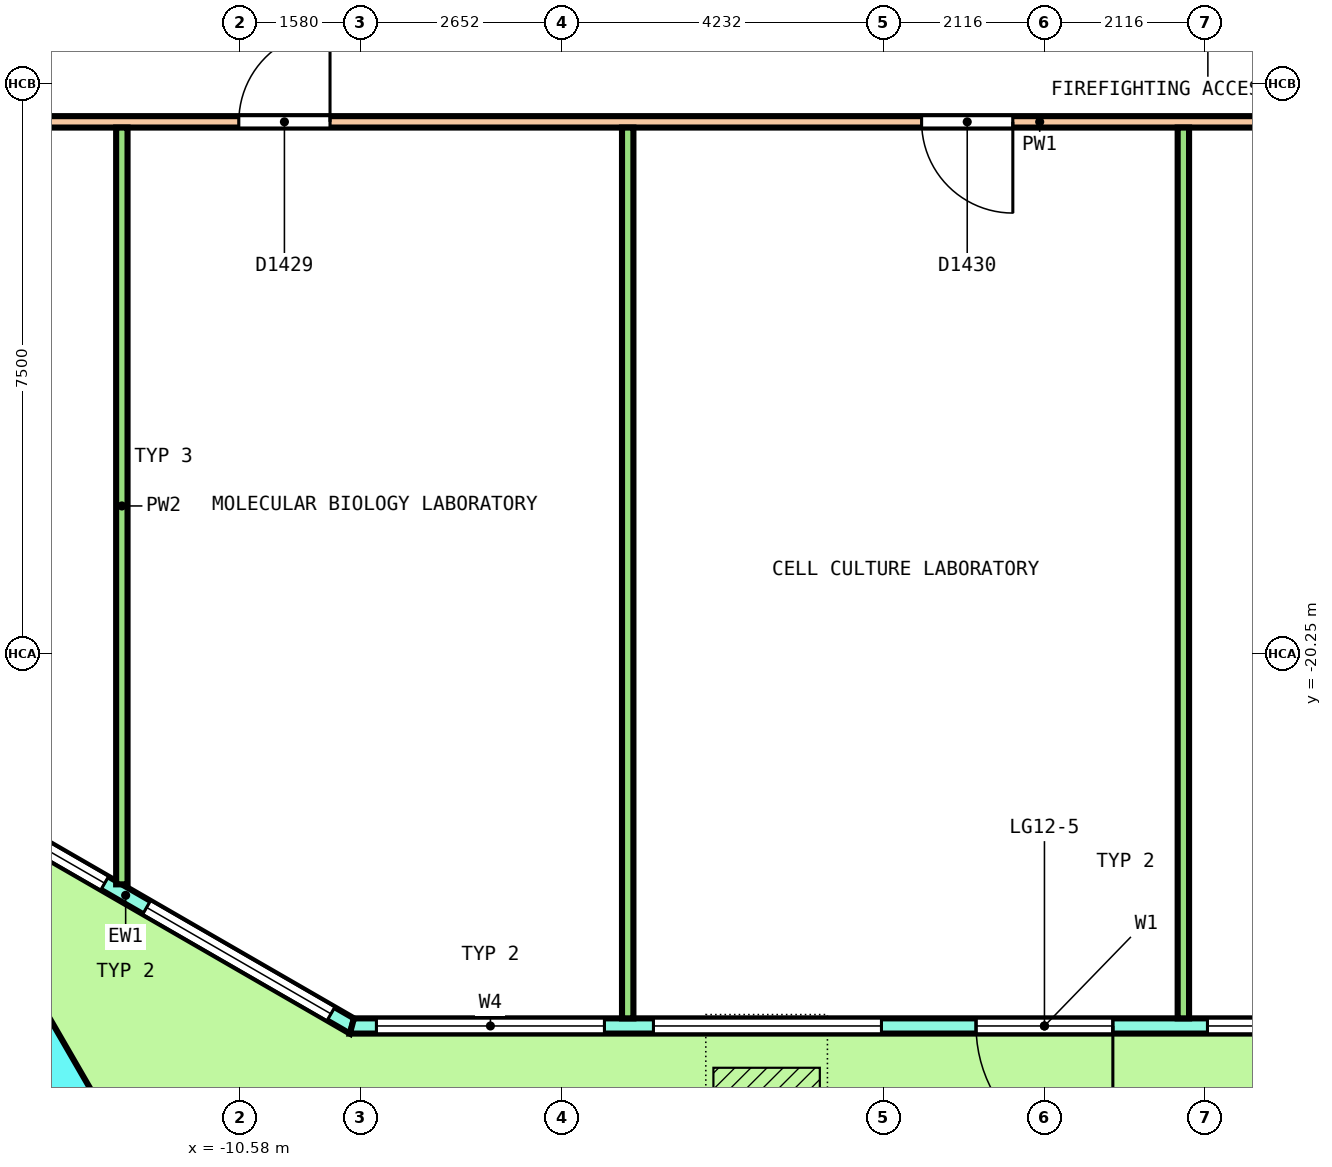
"""IFC4 building model, lengths in metres.
Left out: names, types, materials, properties, quantities, classifications, styles, units other than length and angle.
Written with IfcOpenShell. Run it as: python <this file> out.ifc"""

import sys

from ifc_helpers import new_model, si_unit, direction, frame, frame_2d, origin, origin_2d, place, context, subcontext, project, spatial, polyline, rectangle, outline, extrude, element, fill, save


model = new_model("IFC4")
c1 = context("Model", 3, precision=1e-05, world=origin(), true_north=direction((0.0, 1.0)))
c2 = subcontext(c1, "Body", "Model", "MODEL_VIEW")
j1 = project(units=[si_unit("LENGTHUNIT", "METRE"), si_unit("PLANEANGLEUNIT", "RADIAN")], contexts=[c1])
p1 = place(None, origin())
s1 = spatial("IfcSite", under=j1, at=p1, CompositionType="ELEMENT")
p2 = place(p1, origin())
s2 = spatial("IfcBuilding", under=s1, at=p2, CompositionType="ELEMENT")
p3 = place(p2, frame((0.0, 0.0, 54.2)))
s3 = spatial("IfcBuildingStorey", under=s2, at=p3, CompositionType="ELEMENT", Elevation=54.2)
p4 = place(p3, frame((-13.488, -25.851, 0.0), z_axis=(0.018132595726, -0.031445896907, 0.999340965106), x_axis=(0.865740985748, -0.499504693256, -0.031426215359)))
e1 = element("IfcColumn", 1, at=p4, inside=s3, PredefinedType="COLUMN", context=c2, shape_type="SweptSolid", body=[
    extrude(rectangle(XDim=1.5, YDim=1.5, at=origin_2d()), origin(), (0.0, 0.0, 1.0), 4.053),
])
p5 = place(p3, frame((-15.065, -21.707, 0.0), z_axis=(0.0, 0.0, 1.0), x_axis=(0.866029458321, -0.49999297727, 0.0)))
e2 = element("IfcWall", 2, at=p5, inside=s3, PredefinedType="SOLIDWALL", context=c2, shape_type="SweptSolid", body=[
    extrude(outline(polyline([(-0.027, -0.1), (1.128, -0.1), (2.282, -0.1), (3.437, -0.1), (4.592, -0.1), (5.747, -0.1), (6.901, -0.1), (6.848, 0.1), (5.711, 0.1), (4.574, 0.1), (3.437, 0.1), (2.301, 0.1), (1.164, 0.1), (0.027, 0.1), (-0.027, -0.1)])), origin(), (0.0, 0.0, 1.0), 4.1),
])
p6 = place(p5, frame((0.319, 0.0, 0.1)))
e3 = element("IfcOpeningElement", 3, at=p6, cuts=e2, PredefinedType="OPENING", context=c2, shape_type="SweptSolid", body=[
    extrude(rectangle(XDim=2.8, YDim=2.9, at=frame_2d((1.4, 1.45))), frame((0.0, 0.11, 0.0), z_axis=(0.0, -1.0, 0.0), x_axis=(1.0, 0.0, 0.0)), (0.0, 0.0, 1.0), 0.22),
])
p7 = place(p5, frame((3.756, 0.0, 0.1)))
e4 = element("IfcOpeningElement", 4, at=p7, cuts=e2, PredefinedType="OPENING", context=c2, shape_type="SweptSolid", body=[
    extrude(rectangle(XDim=2.8, YDim=2.9, at=frame_2d((1.4, 1.45))), frame((0.0, 0.11, 0.0), z_axis=(0.0, -1.0, 0.0), x_axis=(1.0, 0.0, 0.0)), (0.0, 0.0, 1.0), 0.22),
])
p8 = place(p3, frame((-9.111, -25.145, 0.0), z_axis=(0.0, 0.0, 1.0), x_axis=(1.0, 0.0, 0.0)))
e5 = element("IfcWall", 5, at=p8, inside=s3, PredefinedType="SOLIDWALL", context=c2, shape_type="SweptSolid", body=[
    extrude(outline(polyline([(-0.027, -0.1), (0.989, -0.1), (2.004, -0.1), (3.019, -0.1), (4.034, -0.1), (5.05, -0.1), (6.065, -0.1), (7.08, -0.1), (8.096, -0.1), (9.111, -0.1), (10.126, -0.1), (11.142, -0.1), (12.157, -0.1), (13.172, -0.1), (14.188, -0.1), (15.203, -0.1), (16.218, -0.1), (17.234, -0.1), (18.249, -0.1), (18.195, 0.1), (17.186, 0.1), (16.177, 0.1), (15.167, 0.1), (14.158, 0.1), (13.148, 0.1), (12.139, 0.1), (11.13, 0.1), (10.12, 0.1), (9.111, 0.1), (8.102, 0.1), (7.092, 0.1), (6.083, 0.1), (5.074, 0.1), (4.064, 0.1), (3.055, 0.1), (2.046, 0.1), (1.036, 0.1), (0.027, 0.1), (-0.027, -0.1)])), origin(), (0.0, 0.0, 1.0), 4.1),
])
p9 = place(p8, frame((0.322, 0.0, 0.1)))
e6 = element("IfcOpeningElement", 6, at=p9, cuts=e5, PredefinedType="OPENING", context=c2, shape_type="SweptSolid", body=[
    extrude(rectangle(XDim=3.0, YDim=2.9, at=frame_2d((1.5, 1.45))), frame((0.0, 0.11, 0.0), z_axis=(0.0, -1.0, 0.0), x_axis=(1.0, 0.0, 0.0)), (0.0, 0.0, 1.0), 0.22),
])
p10 = place(p8, frame((3.967, 0.0, 0.1)))
e7 = element("IfcOpeningElement", 7, at=p10, cuts=e5, PredefinedType="OPENING", context=c2, shape_type="SweptSolid", body=[
    extrude(rectangle(XDim=3.0, YDim=2.9, at=frame_2d((1.5, 1.45))), frame((0.0, 0.11, 0.0), z_axis=(0.0, -1.0, 0.0), x_axis=(1.0, 0.0, 0.0)), (0.0, 0.0, 1.0), 0.22),
])
p11 = place(p8, frame((8.211, 0.0, 0.0)))
e8 = element("IfcOpeningElement", 8, at=p11, cuts=e5, PredefinedType="OPENING", context=c2, shape_type="SweptSolid", body=[
    extrude(rectangle(XDim=1.8, YDim=2.4, at=frame_2d((0.9, 1.2))), frame((0.0, 0.11, 0.0), z_axis=(0.0, -1.0, 0.0), x_axis=(1.0, 0.0, 0.0)), (0.0, 0.0, 1.0), 0.22),
])
p12 = place(p8, frame((8.211, 0.0, 2.55)))
e9 = element("IfcOpeningElement", 9, at=p12, cuts=e5, PredefinedType="OPENING", context=c2, shape_type="SweptSolid", body=[
    extrude(rectangle(XDim=1.8, YDim=0.45, at=frame_2d((0.9, 0.225))), frame((0.0, 0.11, 0.0), z_axis=(0.0, -1.0, 0.0), x_axis=(1.0, 0.0, 0.0)), (0.0, 0.0, 1.0), 0.22),
])
p13 = place(p8, frame((11.256, 0.0, 0.1)))
e10 = element("IfcOpeningElement", 10, at=p13, cuts=e5, PredefinedType="OPENING", context=c2, shape_type="SweptSolid", body=[
    extrude(rectangle(XDim=3.0, YDim=2.9, at=frame_2d((1.5, 1.45))), frame((0.0, 0.11, 0.0), z_axis=(0.0, -1.0, 0.0), x_axis=(1.0, 0.0, 0.0)), (0.0, 0.0, 1.0), 0.22),
])
p14 = place(p8, frame((14.9, 0.0, 0.1)))
e11 = element("IfcOpeningElement", 11, at=p14, cuts=e5, PredefinedType="OPENING", context=c2, shape_type="SweptSolid", body=[
    extrude(rectangle(XDim=3.0, YDim=2.9, at=frame_2d((1.5, 1.45))), frame((0.0, 0.11, 0.0), z_axis=(0.0, -1.0, 0.0), x_axis=(1.0, 0.0, 0.0)), (0.0, 0.0, 1.0), 0.22),
])
p15 = place(p3, frame((-15.725, -13.25, 0.0), z_axis=(0.0, 0.0, 1.0), x_axis=(1.0, 0.0, 0.0)))
e12 = element("IfcWall", 12, at=p15, inside=s3, PredefinedType="PARTITIONING", context=c2, shape_type="SweptSolid", body=[
    extrude(rectangle(XDim=31.325, YDim=0.15, at=frame_2d((15.663, 0.0))), origin(), (0.0, 0.0, 1.0), 3.05),
])
p16 = place(p15, frame((0.878, 0.0, 0.0)))
e13 = element("IfcOpeningElement", 13, at=p16, cuts=e12, PredefinedType="OPENING", context=c2, shape_type="SweptSolid", body=[
    extrude(rectangle(XDim=1.0, YDim=2.1, at=frame_2d((0.5, 1.05))), frame((0.0, 0.085, 0.0), z_axis=(0.0, -1.0, 0.0), x_axis=(1.0, 0.0, 0.0)), (0.0, 0.0, 1.0), 0.17),
])
p17 = place(p15, frame((5.126, 0.0, 0.0)))
e14 = element("IfcOpeningElement", 14, at=p17, cuts=e12, PredefinedType="OPENING", context=c2, shape_type="SweptSolid", body=[
    extrude(rectangle(XDim=1.2, YDim=2.1, at=frame_2d((0.6, 1.05))), frame((0.0, 0.085, 0.0), z_axis=(0.0, -1.0, 0.0), x_axis=(1.0, 0.0, 0.0)), (0.0, 0.0, 1.0), 0.17),
])
p18 = place(p15, frame((14.109, 0.0, 0.0)))
e15 = element("IfcOpeningElement", 15, at=p18, cuts=e12, PredefinedType="OPENING", context=c2, shape_type="SweptSolid", body=[
    extrude(rectangle(XDim=1.2, YDim=2.1, at=frame_2d((0.6, 1.05))), frame((0.0, 0.085, 0.0), z_axis=(0.0, -1.0, 0.0), x_axis=(1.0, 0.0, 0.0)), (0.0, 0.0, 1.0), 0.17),
])
p19 = place(p15, frame((22.11, 0.0, 0.0)))
e16 = element("IfcOpeningElement", 16, at=p19, cuts=e12, PredefinedType="OPENING", context=c2, shape_type="SweptSolid", body=[
    extrude(rectangle(XDim=1.0, YDim=2.1, at=frame_2d((0.5, 1.05))), frame((0.0, 0.085, 0.0), z_axis=(0.0, -1.0, 0.0), x_axis=(1.0, 0.0, 0.0)), (0.0, 0.0, 1.0), 0.17),
])
p20 = place(p15, frame((28.438, 0.0, 0.0)))
e17 = element("IfcOpeningElement", 17, at=p20, cuts=e12, PredefinedType="OPENING", context=c2, shape_type="SweptSolid", body=[
    extrude(rectangle(XDim=1.0, YDim=2.1, at=frame_2d((0.5, 1.05))), frame((0.0, 0.085, 0.0), z_axis=(0.0, -1.0, 0.0), x_axis=(1.0, 0.0, 0.0)), (0.0, 0.0, 1.0), 0.17),
])
p21 = place(p3, frame((-12.138, -23.281, 0.0), z_axis=(0.0, 0.0, 1.0), x_axis=(0.0, 1.0, 0.0)))
e18 = element("IfcWall", 18, at=p21, inside=s3, PredefinedType="PARTITIONING", context=c2, shape_type="SweptSolid", body=[
    extrude(rectangle(XDim=9.957, YDim=0.15, at=frame_2d((4.978, 0.0))), origin(), (0.0, 0.0, 1.0), 3.05),
])
for number, where, z_axis, x_axis in (
    (19, (-5.483, -25.044, 0.0), (0.0, 0.0, 1.0), (0.0, 1.0, 0.0)),
    (20, (1.828, -25.044, 0.0), (0.0, 0.0, 1.0), (0.0, 1.0, 0.0)),
):
    element("IfcWall", number, at=place(p3, frame(where, z_axis=z_axis, x_axis=x_axis)), inside=s3, PredefinedType="PARTITIONING", context=c2, shape_type="SweptSolid", body=[
        extrude(rectangle(XDim=11.719, YDim=0.15, at=frame_2d((5.86, 0.0))), origin(), (0.0, 0.0, 1.0), 3.05),
    ])
p22 = place(p6, origin())
e21 = element("IfcWindow", 21, at=p22, inside=s3, PartitioningType="SINGLE_PANEL", PredefinedType="WINDOW", context=c2, shape_type="SweptSolid", body=[
    extrude(rectangle(XDim=2.8, YDim=2.9, at=frame_2d((1.4, 1.45))), frame((0.0, 0.03, 0.0), z_axis=(0.0, -1.0, 0.0), x_axis=(1.0, 0.0, 0.0)), (0.0, 0.0, 1.0), 0.06),
])
fill(e3, e21)
p23 = place(p7, origin())
e22 = element("IfcWindow", 22, at=p23, inside=s3, PartitioningType="SINGLE_PANEL", PredefinedType="WINDOW", context=c2, shape_type="SweptSolid", body=[
    extrude(rectangle(XDim=2.8, YDim=2.9, at=frame_2d((1.4, 1.45))), frame((0.0, 0.03, 0.0), z_axis=(0.0, -1.0, 0.0), x_axis=(1.0, 0.0, 0.0)), (0.0, 0.0, 1.0), 0.06),
])
fill(e4, e22)
p24 = place(p9, origin())
e23 = element("IfcWindow", 23, at=p24, inside=s3, PartitioningType="SINGLE_PANEL", PredefinedType="WINDOW", context=c2, shape_type="SweptSolid", body=[
    extrude(rectangle(XDim=3.0, YDim=2.9, at=frame_2d((1.5, 1.45))), frame((0.0, 0.03, 0.0), z_axis=(0.0, -1.0, 0.0), x_axis=(1.0, 0.0, 0.0)), (0.0, 0.0, 1.0), 0.06),
])
fill(e6, e23)
p25 = place(p10, origin())
e24 = element("IfcWindow", 24, at=p25, inside=s3, PartitioningType="SINGLE_PANEL", PredefinedType="WINDOW", context=c2, shape_type="SweptSolid", body=[
    extrude(rectangle(XDim=3.0, YDim=2.9, at=frame_2d((1.5, 1.45))), frame((0.0, 0.03, 0.0), z_axis=(0.0, -1.0, 0.0), x_axis=(1.0, 0.0, 0.0)), (0.0, 0.0, 1.0), 0.06),
])
fill(e7, e24)
p26 = place(p11, origin())
e25 = element("IfcDoor", 25, at=p26, inside=s3, OperationType="DOUBLE_DOOR_SINGLE_SWING", PredefinedType="DOOR", context=c2, shape_type="SweptSolid", body=[
    extrude(rectangle(XDim=1.8, YDim=2.4, at=frame_2d((0.9, 1.2))), frame((0.0, 0.025, 0.0), z_axis=(0.0, -1.0, 0.0), x_axis=(1.0, 0.0, 0.0)), (0.0, 0.0, 1.0), 0.05),
])
fill(e8, e25)
p27 = place(p12, origin())
e26 = element("IfcWindow", 26, at=p27, inside=s3, PartitioningType="SINGLE_PANEL", PredefinedType="WINDOW", context=c2, shape_type="SweptSolid", body=[
    extrude(rectangle(XDim=1.8, YDim=0.45, at=frame_2d((0.9, 0.225))), frame((0.0, 0.03, 0.0), z_axis=(0.0, -1.0, 0.0), x_axis=(1.0, 0.0, 0.0)), (0.0, 0.0, 1.0), 0.06),
])
fill(e9, e26)
p28 = place(p13, origin())
e27 = element("IfcWindow", 27, at=p28, inside=s3, PartitioningType="SINGLE_PANEL", PredefinedType="WINDOW", context=c2, shape_type="SweptSolid", body=[
    extrude(rectangle(XDim=3.0, YDim=2.9, at=frame_2d((1.5, 1.45))), frame((0.0, 0.03, 0.0), z_axis=(0.0, -1.0, 0.0), x_axis=(1.0, 0.0, 0.0)), (0.0, 0.0, 1.0), 0.06),
])
fill(e10, e27)
p29 = place(p17, origin())
e28 = element("IfcDoor", 28, at=p29, inside=s3, OperationType="DOUBLE_DOOR_SINGLE_SWING", PredefinedType="DOOR", context=c2, shape_type="SweptSolid", body=[
    extrude(rectangle(XDim=1.2, YDim=2.1, at=frame_2d((0.6, 1.05))), frame((0.0, 0.025, 0.0), z_axis=(0.0, -1.0, 0.0), x_axis=(1.0, 0.0, 0.0)), (0.0, 0.0, 1.0), 0.05),
])
fill(e14, e28)
p30 = place(p18, origin())
e29 = element("IfcDoor", 29, at=p30, inside=s3, OperationType="DOUBLE_DOOR_SINGLE_SWING", PredefinedType="DOOR", context=c2, shape_type="SweptSolid", body=[
    extrude(rectangle(XDim=1.2, YDim=2.1, at=frame_2d((0.6, 1.05))), frame((0.0, 0.025, 0.0), z_axis=(0.0, -1.0, 0.0), x_axis=(1.0, 0.0, 0.0)), (0.0, 0.0, 1.0), 0.05),
])
fill(e15, e29)
save(model, sys.argv[1])
